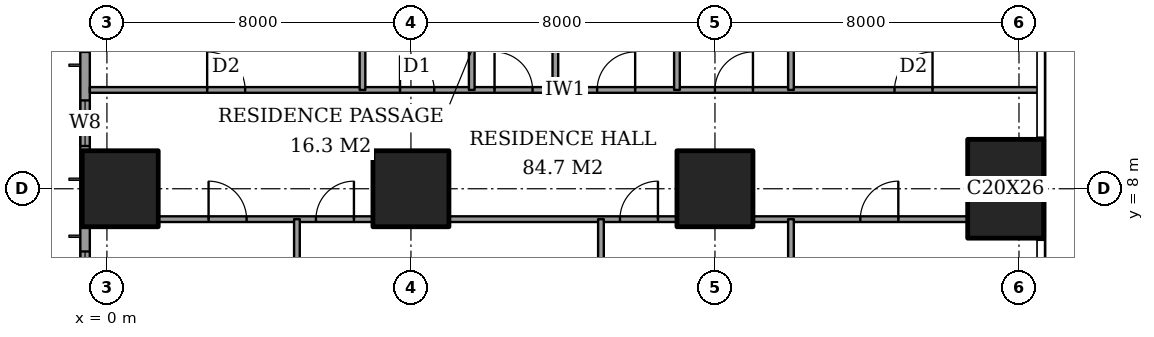
"""IFC4 building model, lengths in metres.
Left out: names, types, materials, properties, quantities, classifications, styles, units other than length and angle.
Written with IfcOpenShell. Run it as: python <this file> out.ifc"""

import sys

from ifc_helpers import new_model, si_unit, direction, frame, frame_2d, origin, origin_2d, place, context, subcontext, project, spatial, rectangle, extrude, element, fill, save


model = new_model("IFC4")
c1 = context("Model", 3, precision=1e-05, world=origin(), true_north=direction((0.0, 1.0)))
c2 = subcontext(c1, "Body", "Model", "MODEL_VIEW")
j1 = project(units=[si_unit("LENGTHUNIT", "METRE"), si_unit("PLANEANGLEUNIT", "RADIAN")], contexts=[c1])
p1 = place(None, origin())
s1 = spatial("IfcSite", under=j1, at=p1, CompositionType="ELEMENT")
p2 = place(p1, origin())
s2 = spatial("IfcBuilding", under=s1, at=p2, CompositionType="ELEMENT")
p3 = place(p2, frame((0.0, 0.0, 62.0)))
s3 = spatial("IfcBuildingStorey", under=s2, at=p3, CompositionType="ELEMENT", Elevation=62.0)
for number, where, z_axis, x_axis in (
    (1, (0.35, 8.0, 0.0), (0.0, 0.0, 1.0), (1.0, 0.0, 0.0)),
    (2, (8.0, 8.0, 0.0), (0.0, 0.0, 1.0), (1.0, 0.0, 0.0)),
    (3, (16.0, 8.0, 0.0), (0.0, 0.0, 1.0), (1.0, 0.0, 0.0)),
):
    element("IfcColumn", number, at=place(p3, frame(where, z_axis=z_axis, x_axis=x_axis)), inside=s3, PredefinedType="COLUMN", context=c2, shape_type="SweptSolid", body=[
        extrude(rectangle(XDim=2.0, YDim=2.0, at=origin_2d()), origin(), (0.0, 0.0, 1.0), 3.6),
    ])
p4 = place(p3, frame((23.65, 8.0, 0.0), z_axis=(0.0, 0.0, 1.0), x_axis=(1.0, 0.0, 0.0)))
e4 = element("IfcColumn", 4, at=p4, inside=s3, PredefinedType="COLUMN", context=c2, shape_type="SweptSolid", body=[
    extrude(rectangle(XDim=2.0, YDim=2.6, at=origin_2d()), origin(), (0.0, 0.0, 1.0), 3.6),
])
p5 = place(p3, frame((-0.575, 44.825, 0.0), z_axis=(0.0, 0.0, 1.0), x_axis=(0.0, -1.0, 0.0)))
e5 = element("IfcWall", 5, at=p5, inside=s3, PredefinedType="SOLIDWALL", context=c2, shape_type="SweptSolid", body=[
    extrude(rectangle(XDim=41.65, YDim=0.25, at=frame_2d((20.825, 0.0))), origin(), (0.0, 0.0, 1.0), 3.6),
])
p6 = place(p5, frame((0.775, 0.0, 0.6)))
e6 = element("IfcOpeningElement", 6, at=p6, cuts=e5, PredefinedType="OPENING", context=c2, shape_type="SweptSolid", body=[
    extrude(rectangle(XDim=2.4, YDim=2.0, at=frame_2d((1.2, 1.0))), frame((0.0, 0.135, 0.0), z_axis=(0.0, -1.0, 0.0), x_axis=(1.0, 0.0, 0.0)), (0.0, 0.0, 1.0), 0.27),
])
p7 = place(p5, frame((6.1, 0.0, 0.6)))
e7 = element("IfcOpeningElement", 7, at=p7, cuts=e5, PredefinedType="OPENING", context=c2, shape_type="SweptSolid", body=[
    extrude(rectangle(XDim=1.2, YDim=2.0, at=frame_2d((0.6, 1.0))), frame((0.0, 0.135, 0.0), z_axis=(0.0, -1.0, 0.0), x_axis=(1.0, 0.0, 0.0)), (0.0, 0.0, 1.0), 0.27),
])
p8 = place(p5, frame((8.425, 0.0, 0.6)))
e8 = element("IfcOpeningElement", 8, at=p8, cuts=e5, PredefinedType="OPENING", context=c2, shape_type="SweptSolid", body=[
    extrude(rectangle(XDim=2.4, YDim=2.0, at=frame_2d((1.2, 1.0))), frame((0.0, 0.135, 0.0), z_axis=(0.0, -1.0, 0.0), x_axis=(1.0, 0.0, 0.0)), (0.0, 0.0, 1.0), 0.27),
])
p9 = place(p5, frame((15.625, 0.0, 0.6)))
e9 = element("IfcOpeningElement", 9, at=p9, cuts=e5, PredefinedType="OPENING", context=c2, shape_type="SweptSolid", body=[
    extrude(rectangle(XDim=2.4, YDim=2.0, at=frame_2d((1.2, 1.0))), frame((0.0, 0.135, 0.0), z_axis=(0.0, -1.0, 0.0), x_axis=(1.0, 0.0, 0.0)), (0.0, 0.0, 1.0), 0.27),
])
p10 = place(p5, frame((23.625, 0.0, 0.6)))
e10 = element("IfcOpeningElement", 10, at=p10, cuts=e5, PredefinedType="OPENING", context=c2, shape_type="SweptSolid", body=[
    extrude(rectangle(XDim=2.4, YDim=2.0, at=frame_2d((1.2, 1.0))), frame((0.0, 0.135, 0.0), z_axis=(0.0, -1.0, 0.0), x_axis=(1.0, 0.0, 0.0)), (0.0, 0.0, 1.0), 0.27),
])
p11 = place(p5, frame((30.825, 0.0, 0.6)))
e11 = element("IfcOpeningElement", 11, at=p11, cuts=e5, PredefinedType="OPENING", context=c2, shape_type="SweptSolid", body=[
    extrude(rectangle(XDim=2.4, YDim=2.0, at=frame_2d((1.2, 1.0))), frame((0.0, 0.135, 0.0), z_axis=(0.0, -1.0, 0.0), x_axis=(1.0, 0.0, 0.0)), (0.0, 0.0, 1.0), 0.27),
])
p12 = place(p5, frame((34.5, 0.0, 0.6)))
e12 = element("IfcOpeningElement", 12, at=p12, cuts=e5, PredefinedType="OPENING", context=c2, shape_type="SweptSolid", body=[
    extrude(rectangle(XDim=1.2, YDim=2.0, at=frame_2d((0.6, 1.0))), frame((0.0, 0.135, 0.0), z_axis=(0.0, -1.0, 0.0), x_axis=(1.0, 0.0, 0.0)), (0.0, 0.0, 1.0), 0.27),
])
p13 = place(p5, frame((38.475, 0.0, 0.6)))
e13 = element("IfcOpeningElement", 13, at=p13, cuts=e5, PredefinedType="OPENING", context=c2, shape_type="SweptSolid", body=[
    extrude(rectangle(XDim=2.4, YDim=2.0, at=frame_2d((1.2, 1.0))), frame((0.0, 0.135, 0.0), z_axis=(0.0, -1.0, 0.0), x_axis=(1.0, 0.0, 0.0)), (0.0, 0.0, 1.0), 0.27),
])
p14 = place(p3, frame((1.35, 7.2, 0.0), z_axis=(0.0, 0.0, 1.0), x_axis=(1.0, 0.0, 0.0)))
e14 = element("IfcWall", 14, at=p14, inside=s3, PredefinedType="PARTITIONING", context=c2, shape_type="SweptSolid", body=[
    extrude(rectangle(XDim=5.65, YDim=0.15, at=frame_2d((2.825, 0.0))), origin(), (0.0, 0.0, 1.0), 3.35),
])
p15 = place(p14, frame((1.325, 0.0, 0.0)))
e15 = element("IfcOpeningElement", 15, at=p15, cuts=e14, PredefinedType="OPENING", context=c2, shape_type="SweptSolid", body=[
    extrude(rectangle(XDim=1.0, YDim=2.1, at=frame_2d((0.5, 1.05))), frame((0.0, 0.085, 0.0), z_axis=(0.0, -1.0, 0.0), x_axis=(1.0, 0.0, 0.0)), (0.0, 0.0, 1.0), 0.17),
])
p16 = place(p14, frame((4.15, 0.0, 0.0)))
e16 = element("IfcOpeningElement", 16, at=p16, cuts=e14, PredefinedType="OPENING", context=c2, shape_type="SweptSolid", body=[
    extrude(rectangle(XDim=1.0, YDim=2.1, at=frame_2d((0.5, 1.05))), frame((0.0, 0.085, 0.0), z_axis=(0.0, -1.0, 0.0), x_axis=(1.0, 0.0, 0.0)), (0.0, 0.0, 1.0), 0.17),
])
p17 = place(p3, frame((9.0, 7.2, 0.0), z_axis=(0.0, 0.0, 1.0), x_axis=(1.0, 0.0, 0.0)))
e17 = element("IfcWall", 17, at=p17, inside=s3, PredefinedType="PARTITIONING", context=c2, shape_type="SweptSolid", body=[
    extrude(rectangle(XDim=6.0, YDim=0.15, at=frame_2d((3.0, 0.0))), origin(), (0.0, 0.0, 1.0), 3.35),
])
p18 = place(p17, frame((4.5, 0.0, 0.0)))
e18 = element("IfcOpeningElement", 18, at=p18, cuts=e17, PredefinedType="OPENING", context=c2, shape_type="SweptSolid", body=[
    extrude(rectangle(XDim=1.0, YDim=2.1, at=frame_2d((0.5, 1.05))), frame((0.0, 0.085, 0.0), z_axis=(0.0, -1.0, 0.0), x_axis=(1.0, 0.0, 0.0)), (0.0, 0.0, 1.0), 0.17),
])
p19 = place(p3, frame((17.0, 7.2, 0.0), z_axis=(0.0, 0.0, 1.0), x_axis=(1.0, 0.0, 0.0)))
e19 = element("IfcWall", 19, at=p19, inside=s3, PredefinedType="PARTITIONING", context=c2, shape_type="SweptSolid", body=[
    extrude(rectangle(XDim=5.65, YDim=0.15, at=frame_2d((2.825, 0.0))), origin(), (0.0, 0.0, 1.0), 3.35),
])
p20 = place(p19, frame((2.825, 0.0, 0.0)))
e20 = element("IfcOpeningElement", 20, at=p20, cuts=e19, PredefinedType="OPENING", context=c2, shape_type="SweptSolid", body=[
    extrude(rectangle(XDim=1.0, YDim=2.1, at=frame_2d((0.5, 1.05))), frame((0.0, 0.085, 0.0), z_axis=(0.0, -1.0, 0.0), x_axis=(1.0, 0.0, 0.0)), (0.0, 0.0, 1.0), 0.17),
])
p21 = place(p3, frame((-0.45, 10.6, 0.0), z_axis=(0.0, 0.0, 1.0), x_axis=(1.0, 0.0, 0.0)))
e21 = element("IfcWall", 21, at=p21, inside=s3, PredefinedType="PARTITIONING", context=c2, shape_type="SweptSolid", body=[
    extrude(rectangle(XDim=25.011, YDim=0.15, at=frame_2d((12.505, 0.0))), origin(), (0.0, 0.0, 1.0), 3.35),
])
p22 = place(p21, frame((10.65, 0.0, 0.0)))
e22 = element("IfcOpeningElement", 22, at=p22, cuts=e21, PredefinedType="OPENING", context=c2, shape_type="SweptSolid", body=[
    extrude(rectangle(XDim=1.0, YDim=2.1, at=frame_2d((0.5, 1.05))), frame((0.0, 0.085, 0.0), z_axis=(0.0, -1.0, 0.0), x_axis=(1.0, 0.0, 0.0)), (0.0, 0.0, 1.0), 0.17),
])
p23 = place(p21, frame((3.087, 0.0, 0.0)))
e23 = element("IfcOpeningElement", 23, at=p23, cuts=e21, PredefinedType="OPENING", context=c2, shape_type="SweptSolid", body=[
    extrude(rectangle(XDim=1.0, YDim=2.1, at=frame_2d((0.5, 1.05))), frame((0.0, 0.085, 0.0), z_axis=(0.0, -1.0, 0.0), x_axis=(1.0, 0.0, 0.0)), (0.0, 0.0, 1.0), 0.17),
])
p24 = place(p21, frame((8.163, 0.0, 0.0)))
e24 = element("IfcOpeningElement", 24, at=p24, cuts=e21, PredefinedType="OPENING", context=c2, shape_type="SweptSolid", body=[
    extrude(rectangle(XDim=0.9, YDim=2.1, at=frame_2d((0.45, 1.05))), frame((0.0, 0.085, 0.0), z_axis=(0.0, -1.0, 0.0), x_axis=(1.0, 0.0, 0.0)), (0.0, 0.0, 1.0), 0.17),
])
p25 = place(p21, frame((13.35, 0.0, 0.0)))
e25 = element("IfcOpeningElement", 25, at=p25, cuts=e21, PredefinedType="OPENING", context=c2, shape_type="SweptSolid", body=[
    extrude(rectangle(XDim=1.0, YDim=2.1, at=frame_2d((0.5, 1.05))), frame((0.0, 0.085, 0.0), z_axis=(0.0, -1.0, 0.0), x_axis=(1.0, 0.0, 0.0)), (0.0, 0.0, 1.0), 0.17),
])
p26 = place(p21, frame((16.45, 0.0, 0.0)))
e26 = element("IfcOpeningElement", 26, at=p26, cuts=e21, PredefinedType="OPENING", context=c2, shape_type="SweptSolid", body=[
    extrude(rectangle(XDim=1.0, YDim=2.1, at=frame_2d((0.5, 1.05))), frame((0.0, 0.085, 0.0), z_axis=(0.0, -1.0, 0.0), x_axis=(1.0, 0.0, 0.0)), (0.0, 0.0, 1.0), 0.17),
])
p27 = place(p21, frame((21.175, 0.0, 0.0)))
e27 = element("IfcOpeningElement", 27, at=p27, cuts=e21, PredefinedType="OPENING", context=c2, shape_type="SweptSolid", body=[
    extrude(rectangle(XDim=1.0, YDim=2.1, at=frame_2d((0.5, 1.05))), frame((0.0, 0.085, 0.0), z_axis=(0.0, -1.0, 0.0), x_axis=(1.0, 0.0, 0.0)), (0.0, 0.0, 1.0), 0.17),
])
p28 = place(p3, frame((5.0, -0.45, 0.0), z_axis=(0.0, 0.0, 1.0), x_axis=(0.0, 1.0, 0.0)))
e28 = element("IfcWall", 28, at=p28, inside=s3, PredefinedType="PARTITIONING", context=c2, shape_type="SweptSolid", body=[
    extrude(rectangle(XDim=7.65, YDim=0.15, at=frame_2d((3.825, 0.0))), origin(), (0.0, 0.0, 1.0), 3.35),
])
p29 = place(p3, frame((6.725, 10.6, 0.0), z_axis=(0.0, 0.0, 1.0), x_axis=(0.0, 1.0, 0.0)))
e29 = element("IfcWall", 29, at=p29, inside=s3, PredefinedType="PARTITIONING", context=c2, shape_type="SweptSolid", body=[
    extrude(rectangle(XDim=4.2, YDim=0.15, at=frame_2d((2.1, 0.0))), origin(), (0.0, 0.0, 1.0), 3.35),
])
p30 = place(p3, frame((9.6, 10.6, 0.0), z_axis=(0.0, 0.0, 1.0), x_axis=(0.0, 1.0, 0.0)))
e30 = element("IfcWall", 30, at=p30, inside=s3, PredefinedType="PARTITIONING", context=c2, shape_type="SweptSolid", body=[
    extrude(rectangle(XDim=11.0, YDim=0.15, at=frame_2d((5.5, 0.0))), origin(), (0.0, 0.0, 1.0), 3.35),
])
p31 = place(p30, frame((8.7, 0.0, 0.0)))
e31 = element("IfcOpeningElement", 31, at=p31, cuts=e30, PredefinedType="OPENING", context=c2, shape_type="SweptSolid", body=[
    extrude(rectangle(XDim=1.0, YDim=2.1, at=frame_2d((0.5, 1.05))), frame((0.0, 0.085, 0.0), z_axis=(0.0, -1.0, 0.0), x_axis=(1.0, 0.0, 0.0)), (0.0, 0.0, 1.0), 0.17),
])
p32 = place(p3, frame((11.8, 10.6, 0.0), z_axis=(0.0, 0.0, 1.0), x_axis=(0.0, 1.0, 0.0)))
e32 = element("IfcWall", 32, at=p32, inside=s3, PredefinedType="PARTITIONING", context=c2, shape_type="SweptSolid", body=[
    extrude(rectangle(XDim=7.4, YDim=0.15, at=frame_2d((3.7, 0.0))), origin(), (0.0, 0.0, 1.0), 3.35),
])
p33 = place(p3, frame((13.0, -0.45, 0.0), z_axis=(0.0, 0.0, 1.0), x_axis=(0.0, 1.0, 0.0)))
e33 = element("IfcWall", 33, at=p33, inside=s3, PredefinedType="PARTITIONING", context=c2, shape_type="SweptSolid", body=[
    extrude(rectangle(XDim=7.65, YDim=0.15, at=frame_2d((3.825, 0.0))), origin(), (0.0, 0.0, 1.0), 3.35),
])
p34 = place(p3, frame((15.0, 10.6, 0.0), z_axis=(0.0, 0.0, 1.0), x_axis=(0.0, 1.0, 0.0)))
e34 = element("IfcWall", 34, at=p34, inside=s3, PredefinedType="PARTITIONING", context=c2, shape_type="SweptSolid", body=[
    extrude(rectangle(XDim=4.2, YDim=0.15, at=frame_2d((2.1, 0.0))), origin(), (0.0, 0.0, 1.0), 3.35),
])
p35 = place(p3, frame((18.0, -0.45, 0.0), z_axis=(0.0, 0.0, 1.0), x_axis=(0.0, 1.0, 0.0)))
e35 = element("IfcWall", 35, at=p35, inside=s3, PredefinedType="PARTITIONING", context=c2, shape_type="SweptSolid", body=[
    extrude(rectangle(XDim=7.65, YDim=0.15, at=frame_2d((3.825, 0.0))), origin(), (0.0, 0.0, 1.0), 3.35),
])
p36 = place(p3, frame((18.0, 10.6, 0.0), z_axis=(0.0, 0.0, 1.0), x_axis=(0.0, 1.0, 0.0)))
e36 = element("IfcWall", 36, at=p36, inside=s3, PredefinedType="PARTITIONING", context=c2, shape_type="SweptSolid", body=[
    extrude(rectangle(XDim=7.4, YDim=0.15, at=frame_2d((3.7, 0.0))), origin(), (0.0, 0.0, 1.0), 3.35),
])
p37 = place(p12, origin())
e37 = element("IfcWindow", 37, at=p37, inside=s3, PartitioningType="SINGLE_PANEL", PredefinedType="WINDOW", context=c2, shape_type="SweptSolid", body=[
    extrude(rectangle(XDim=1.2, YDim=2.0, at=frame_2d((0.6, 1.0))), frame((0.0, 0.03, 0.0), z_axis=(0.0, -1.0, 0.0), x_axis=(1.0, 0.0, 0.0)), (0.0, 0.0, 1.0), 0.06),
])
fill(e12, e37)
p38 = place(p13, origin())
e38 = element("IfcWindow", 38, at=p38, inside=s3, PartitioningType="SINGLE_PANEL", PredefinedType="WINDOW", context=c2, shape_type="SweptSolid", body=[
    extrude(rectangle(XDim=2.4, YDim=2.0, at=frame_2d((1.2, 1.0))), frame((0.0, 0.03, 0.0), z_axis=(0.0, -1.0, 0.0), x_axis=(1.0, 0.0, 0.0)), (0.0, 0.0, 1.0), 0.06),
])
fill(e13, e38)
p39 = place(p15, origin())
e39 = element("IfcDoor", 39, at=p39, inside=s3, OperationType="SINGLE_SWING_RIGHT", PredefinedType="DOOR", context=c2, shape_type="SweptSolid", body=[
    extrude(rectangle(XDim=1.0, YDim=2.1, at=frame_2d((0.5, 1.05))), frame((0.0, 0.025, 0.0), z_axis=(0.0, -1.0, 0.0), x_axis=(1.0, 0.0, 0.0)), (0.0, 0.0, 1.0), 0.05),
])
fill(e15, e39)
p40 = place(p16, origin())
e40 = element("IfcDoor", 40, at=p40, inside=s3, OperationType="SINGLE_SWING_LEFT", PredefinedType="DOOR", context=c2, shape_type="SweptSolid", body=[
    extrude(rectangle(XDim=1.0, YDim=2.1, at=frame_2d((0.5, 1.05))), frame((0.0, 0.025, 0.0), z_axis=(0.0, -1.0, 0.0), x_axis=(1.0, 0.0, 0.0)), (0.0, 0.0, 1.0), 0.05),
])
fill(e16, e40)
p41 = place(p18, origin())
e41 = element("IfcDoor", 41, at=p41, inside=s3, OperationType="SINGLE_SWING_LEFT", PredefinedType="DOOR", context=c2, shape_type="SweptSolid", body=[
    extrude(rectangle(XDim=1.0, YDim=2.1, at=frame_2d((0.5, 1.05))), frame((0.0, 0.025, 0.0), z_axis=(0.0, -1.0, 0.0), x_axis=(1.0, 0.0, 0.0)), (0.0, 0.0, 1.0), 0.05),
])
fill(e18, e41)
p42 = place(p20, origin())
e42 = element("IfcDoor", 42, at=p42, inside=s3, OperationType="SINGLE_SWING_LEFT", PredefinedType="DOOR", context=c2, shape_type="SweptSolid", body=[
    extrude(rectangle(XDim=1.0, YDim=2.1, at=frame_2d((0.5, 1.05))), frame((0.0, 0.025, 0.0), z_axis=(0.0, -1.0, 0.0), x_axis=(1.0, 0.0, 0.0)), (0.0, 0.0, 1.0), 0.05),
])
fill(e20, e42)
p43 = place(p22, origin())
e43 = element("IfcDoor", 43, at=p43, inside=s3, OperationType="SINGLE_SWING_RIGHT", PredefinedType="DOOR", context=c2, shape_type="SweptSolid", body=[
    extrude(rectangle(XDim=1.0, YDim=2.1, at=frame_2d((0.5, 1.05))), frame((0.0, 0.025, 0.0), z_axis=(0.0, -1.0, 0.0), x_axis=(1.0, 0.0, 0.0)), (0.0, 0.0, 1.0), 0.05),
])
fill(e22, e43)
p44 = place(p23, origin())
e44 = element("IfcDoor", 44, at=p44, inside=s3, OperationType="SINGLE_SWING_RIGHT", PredefinedType="DOOR", context=c2, shape_type="SweptSolid", body=[
    extrude(rectangle(XDim=1.0, YDim=2.1, at=frame_2d((0.5, 1.05))), frame((0.0, 0.025, 0.0), z_axis=(0.0, -1.0, 0.0), x_axis=(1.0, 0.0, 0.0)), (0.0, 0.0, 1.0), 0.05),
])
fill(e23, e44)
p45 = place(p24, origin())
e45 = element("IfcDoor", 45, at=p45, inside=s3, OperationType="SINGLE_SWING_RIGHT", PredefinedType="DOOR", context=c2, shape_type="SweptSolid", body=[
    extrude(rectangle(XDim=0.9, YDim=2.1, at=frame_2d((0.45, 1.05))), frame((0.0, 0.025, 0.0), z_axis=(0.0, -1.0, 0.0), x_axis=(1.0, 0.0, 0.0)), (0.0, 0.0, 1.0), 0.05),
])
fill(e24, e45)
p46 = place(p25, origin())
e46 = element("IfcDoor", 46, at=p46, inside=s3, OperationType="SINGLE_SWING_LEFT", PredefinedType="DOOR", context=c2, shape_type="SweptSolid", body=[
    extrude(rectangle(XDim=1.0, YDim=2.1, at=frame_2d((0.5, 1.05))), frame((0.0, 0.025, 0.0), z_axis=(0.0, -1.0, 0.0), x_axis=(1.0, 0.0, 0.0)), (0.0, 0.0, 1.0), 0.05),
])
fill(e25, e46)
p47 = place(p26, origin())
e47 = element("IfcDoor", 47, at=p47, inside=s3, OperationType="SINGLE_SWING_LEFT", PredefinedType="DOOR", context=c2, shape_type="SweptSolid", body=[
    extrude(rectangle(XDim=1.0, YDim=2.1, at=frame_2d((0.5, 1.05))), frame((0.0, 0.025, 0.0), z_axis=(0.0, -1.0, 0.0), x_axis=(1.0, 0.0, 0.0)), (0.0, 0.0, 1.0), 0.05),
])
fill(e26, e47)
p48 = place(p27, origin())
e48 = element("IfcDoor", 48, at=p48, inside=s3, OperationType="SINGLE_SWING_LEFT", PredefinedType="DOOR", context=c2, shape_type="SweptSolid", body=[
    extrude(rectangle(XDim=1.0, YDim=2.1, at=frame_2d((0.5, 1.05))), frame((0.0, 0.025, 0.0), z_axis=(0.0, -1.0, 0.0), x_axis=(1.0, 0.0, 0.0)), (0.0, 0.0, 1.0), 0.05),
])
fill(e27, e48)
save(model, sys.argv[1])
